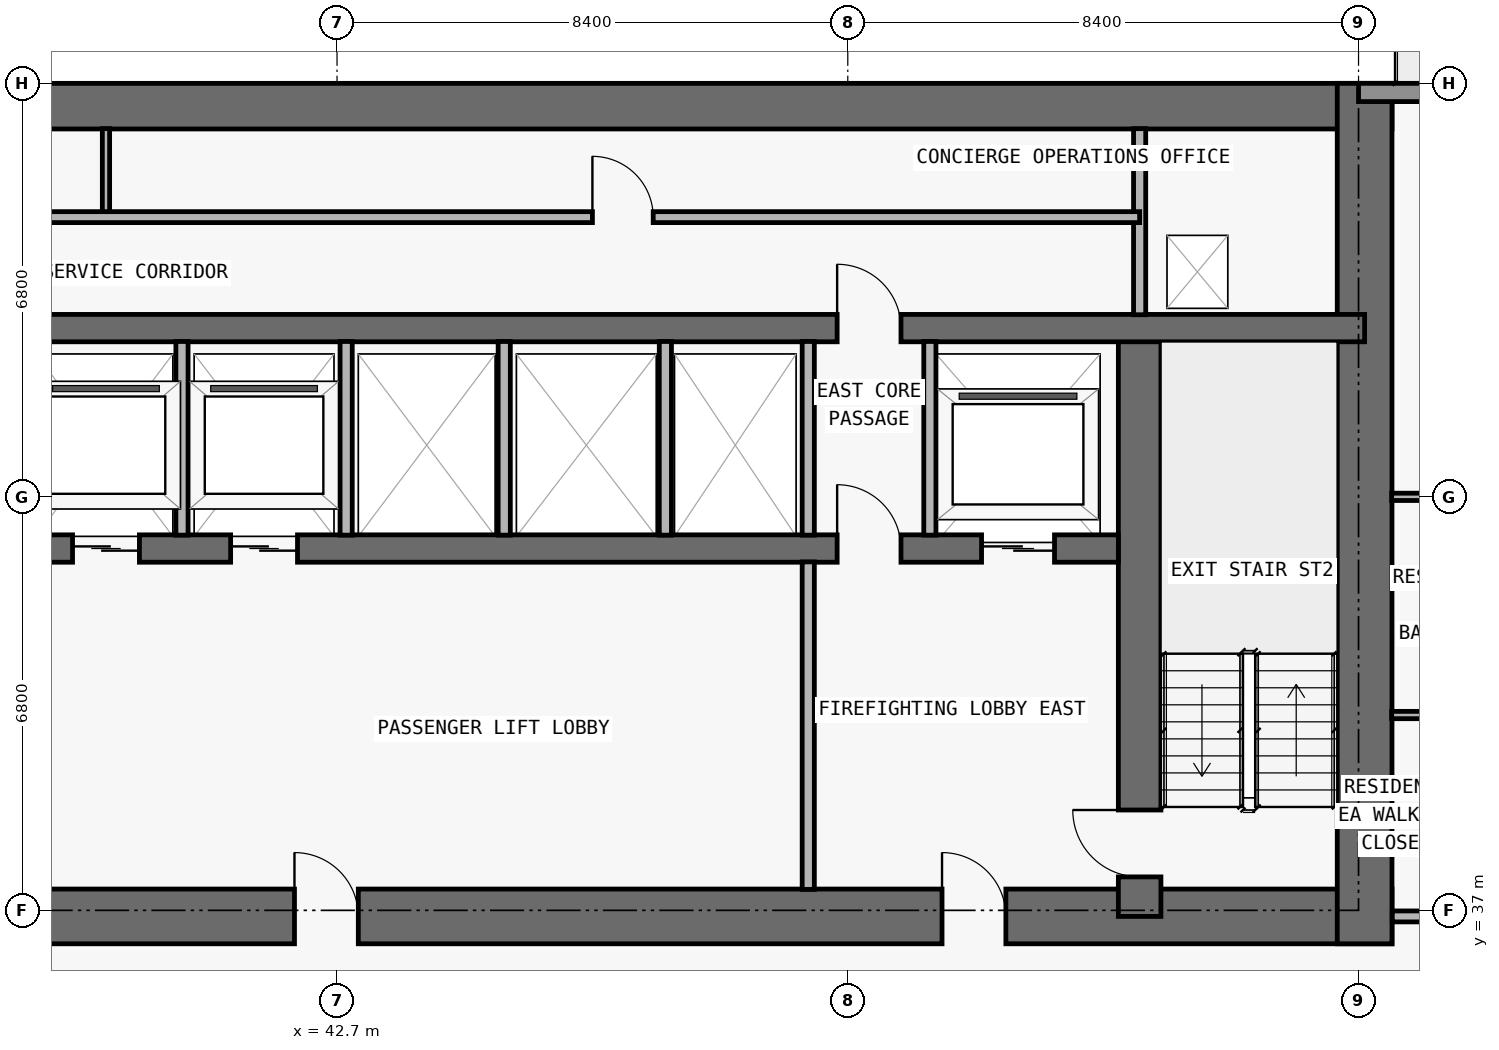
"""IFC4 building model, lengths in metres.
Left out: names, types, materials, properties, quantities, classifications, styles, units other than length and angle.
Written with IfcOpenShell. Run it as: python <this file> out.ifc"""

import sys

from ifc_helpers import new_model, si_unit, direction, frame, frame_2d, origin, place, context, subcontext, project, spatial, rectangle, extrude, element, fill, save


model = new_model("IFC4")
c1 = context("Model", 3, precision=1e-05, world=origin(), true_north=direction((0.0, 1.0)))
c2 = subcontext(c1, "Body", "Model", "MODEL_VIEW")
j1 = project(units=[si_unit("LENGTHUNIT", "METRE"), si_unit("PLANEANGLEUNIT", "RADIAN")], contexts=[c1])
p1 = place(None, origin())
s1 = spatial("IfcSite", under=j1, at=p1, CompositionType="ELEMENT")
p2 = place(p1, origin())
s2 = spatial("IfcBuilding", under=s1, at=p2, CompositionType="ELEMENT")
p3 = place(p2, frame((0.0, 0.0, 69.6)))
s3 = spatial("IfcBuildingStorey", under=s2, at=p3, CompositionType="ELEMENT", Elevation=69.6)
p4 = place(p3, frame((17.75, 36.9, 0.0), z_axis=(0.0, 0.0, 1.0), x_axis=(1.0, 0.0, 0.0)))
e1 = element("IfcWall", 1, at=p4, inside=s3, PredefinedType="SHEAR", context=c2, shape_type="SweptSolid", body=[
    extrude(rectangle(XDim=42.3, YDim=0.9, at=frame_2d((21.15, 0.0))), origin(), (0.0, 0.0, 1.0), 3.05),
])
p5 = place(p4, frame((14.55, 0.0, 0.0)))
e2 = element("IfcOpeningElement", 2, at=p5, cuts=e1, PredefinedType="OPENING", context=c2, shape_type="SweptSolid", body=[
    extrude(rectangle(XDim=1.1, YDim=2.15, at=frame_2d((0.55, 1.075))), frame((0.0, 0.46, 0.0), z_axis=(0.0, -1.0, 0.0), x_axis=(1.0, 0.0, 0.0)), (0.0, 0.0, 1.0), 0.92),
])
p6 = place(p4, frame((6.4, 0.0, 0.0)))
e3 = element("IfcOpeningElement", 3, at=p6, cuts=e1, PredefinedType="OPENING", context=c2, shape_type="SweptSolid", body=[
    extrude(rectangle(XDim=1.05, YDim=2.15, at=frame_2d((0.525, 1.075))), frame((0.0, 0.46, 0.0), z_axis=(0.0, -1.0, 0.0), x_axis=(1.0, 0.0, 0.0)), (0.0, 0.0, 1.0), 0.92),
])
p7 = place(p4, frame((34.9, 0.0, 0.0)))
e4 = element("IfcOpeningElement", 4, at=p7, cuts=e1, PredefinedType="OPENING", context=c2, shape_type="SweptSolid", body=[
    extrude(rectangle(XDim=1.05, YDim=2.15, at=frame_2d((0.525, 1.075))), frame((0.0, 0.46, 0.0), z_axis=(0.0, -1.0, 0.0), x_axis=(1.0, 0.0, 0.0)), (0.0, 0.0, 1.0), 0.92),
])
p8 = place(p4, frame((11.012, 0.0, 0.0)))
e5 = element("IfcOpeningElement", 5, at=p8, cuts=e1, PredefinedType="OPENING", context=c2, shape_type="SweptSolid", body=[
    extrude(rectangle(XDim=1.05, YDim=2.15, at=frame_2d((0.525, 1.075))), frame((0.0, 0.46, 0.0), z_axis=(0.0, -1.0, 0.0), x_axis=(1.0, 0.0, 0.0)), (0.0, 0.0, 1.0), 0.92),
])
p9 = place(p4, frame((24.25, 0.0, 0.0)))
e6 = element("IfcOpeningElement", 6, at=p9, cuts=e1, PredefinedType="OPENING", context=c2, shape_type="SweptSolid", body=[
    extrude(rectangle(XDim=1.05, YDim=2.15, at=frame_2d((0.525, 1.075))), frame((0.0, 0.46, 0.0), z_axis=(0.0, -1.0, 0.0), x_axis=(1.0, 0.0, 0.0)), (0.0, 0.0, 1.0), 0.92),
])
p10 = place(p3, frame((17.75, 50.225, 0.0), z_axis=(0.0, 0.0, 1.0), x_axis=(1.0, 0.0, 0.0)))
e7 = element("IfcWall", 7, at=p10, inside=s3, PredefinedType="SHEAR", context=c2, shape_type="SweptSolid", body=[
    extrude(rectangle(XDim=42.3, YDim=0.75, at=frame_2d((21.15, 0.0))), origin(), (0.0, 0.0, 1.0), 3.05),
])
p11 = place(p3, frame((59.6, 36.45, 0.0), z_axis=(0.0, 0.0, 1.0), x_axis=(0.0, 1.0, 0.0)))
e8 = element("IfcWall", 8, at=p11, inside=s3, PredefinedType="SHEAR", context=c2, shape_type="SweptSolid", body=[
    extrude(rectangle(XDim=14.15, YDim=0.9, at=frame_2d((7.075, 0.0))), origin(), (0.0, 0.0, 1.0), 3.05),
])
p12 = place(p3, frame((55.9, 36.9, 0.0), z_axis=(0.0, 0.0, 1.0), x_axis=(0.0, 1.0, 0.0)))
e9 = element("IfcWall", 9, at=p12, inside=s3, PredefinedType="SHEAR", context=c2, shape_type="SweptSolid", body=[
    extrude(rectangle(XDim=9.675, YDim=0.7, at=frame_2d((4.837, 0.0))), origin(), (0.0, 0.0, 1.0), 3.05),
])
p13 = place(p12, frame((0.65, 0.0, 0.0)))
e10 = element("IfcOpeningElement", 10, at=p13, cuts=e9, PredefinedType="OPENING", context=c2, shape_type="SweptSolid", body=[
    extrude(rectangle(XDim=1.1, YDim=2.15, at=frame_2d((0.55, 1.075))), frame((0.0, 0.36, 0.0), z_axis=(0.0, -1.0, 0.0), x_axis=(1.0, 0.0, 0.0)), (0.0, 0.0, 1.0), 0.72),
])
p14 = place(p3, frame((22.25, 42.95, 0.0), z_axis=(0.0, 0.0, 1.0), x_axis=(1.0, 0.0, 0.0)))
e11 = element("IfcWall", 11, at=p14, inside=s3, PredefinedType="SHEAR", context=c2, shape_type="SweptSolid", body=[
    extrude(rectangle(XDim=33.3, YDim=0.45, at=frame_2d((16.65, 0.0))), origin(), (0.0, 0.0, 1.0), 3.05),
])
p15 = place(p14, frame((1.05, 0.0, 0.0)))
e12 = element("IfcOpeningElement", 12, at=p15, cuts=e11, PredefinedType="OPENING", context=c2, shape_type="SweptSolid", body=[
    extrude(rectangle(XDim=1.2, YDim=2.2, at=frame_2d((0.6, 1.1))), frame((0.0, 0.235, 0.0), z_axis=(0.0, -1.0, 0.0), x_axis=(1.0, 0.0, 0.0)), (0.0, 0.0, 1.0), 0.47),
])
p16 = place(p14, frame((31.05, 0.0, 0.0)))
e13 = element("IfcOpeningElement", 13, at=p16, cuts=e11, PredefinedType="OPENING", context=c2, shape_type="SweptSolid", body=[
    extrude(rectangle(XDim=1.2, YDim=2.2, at=frame_2d((0.6, 1.1))), frame((0.0, 0.235, 0.0), z_axis=(0.0, -1.0, 0.0), x_axis=(1.0, 0.0, 0.0)), (0.0, 0.0, 1.0), 0.47),
])
p17 = place(p14, frame((13.5, 0.0, 0.0)))
e14 = element("IfcOpeningElement", 14, at=p17, cuts=e11, PredefinedType="OPENING", context=c2, shape_type="SweptSolid", body=[
    extrude(rectangle(XDim=1.1, YDim=2.2, at=frame_2d((0.55, 1.1))), frame((0.0, 0.235, 0.0), z_axis=(0.0, -1.0, 0.0), x_axis=(1.0, 0.0, 0.0)), (0.0, 0.0, 1.0), 0.47),
])
p18 = place(p14, frame((16.1, 0.0, 0.0)))
e15 = element("IfcOpeningElement", 15, at=p18, cuts=e11, PredefinedType="OPENING", context=c2, shape_type="SweptSolid", body=[
    extrude(rectangle(XDim=1.1, YDim=2.2, at=frame_2d((0.55, 1.1))), frame((0.0, 0.235, 0.0), z_axis=(0.0, -1.0, 0.0), x_axis=(1.0, 0.0, 0.0)), (0.0, 0.0, 1.0), 0.47),
])
p19 = place(p14, frame((18.7, 0.0, 0.0)))
e16 = element("IfcOpeningElement", 16, at=p19, cuts=e11, PredefinedType="OPENING", context=c2, shape_type="SweptSolid", body=[
    extrude(rectangle(XDim=1.1, YDim=2.2, at=frame_2d((0.55, 1.1))), frame((0.0, 0.235, 0.0), z_axis=(0.0, -1.0, 0.0), x_axis=(1.0, 0.0, 0.0)), (0.0, 0.0, 1.0), 0.47),
])
p20 = place(p14, frame((3.625, 0.0, 0.0)))
e17 = element("IfcOpeningElement", 17, at=p20, cuts=e11, PredefinedType="OPENING", context=c2, shape_type="SweptSolid", body=[
    extrude(rectangle(XDim=1.05, YDim=2.15, at=frame_2d((0.525, 1.075))), frame((0.0, 0.235, 0.0), z_axis=(0.0, -1.0, 0.0), x_axis=(1.0, 0.0, 0.0)), (0.0, 0.0, 1.0), 0.47),
])
p21 = place(p14, frame((28.675, 0.0, 0.0)))
e18 = element("IfcOpeningElement", 18, at=p21, cuts=e11, PredefinedType="OPENING", context=c2, shape_type="SweptSolid", body=[
    extrude(rectangle(XDim=1.05, YDim=2.15, at=frame_2d((0.525, 1.075))), frame((0.0, 0.235, 0.0), z_axis=(0.0, -1.0, 0.0), x_axis=(1.0, 0.0, 0.0)), (0.0, 0.0, 1.0), 0.47),
])
p22 = place(p3, frame((18.2, 46.575, 0.0), z_axis=(0.0, 0.0, 1.0), x_axis=(1.0, 0.0, 0.0)))
e19 = element("IfcWall", 19, at=p22, inside=s3, PredefinedType="SHEAR", context=c2, shape_type="SweptSolid", body=[
    extrude(rectangle(XDim=41.4, YDim=0.45, at=frame_2d((20.7, 0.0))), origin(), (0.0, 0.0, 1.0), 3.05),
])
p23 = place(p22, frame((7.675, 0.0, 0.0)))
e20 = element("IfcOpeningElement", 20, at=p23, cuts=e19, PredefinedType="OPENING", context=c2, shape_type="SweptSolid", body=[
    extrude(rectangle(XDim=1.05, YDim=2.15, at=frame_2d((0.525, 1.075))), frame((0.0, 0.235, 0.0), z_axis=(0.0, -1.0, 0.0), x_axis=(1.0, 0.0, 0.0)), (0.0, 0.0, 1.0), 0.47),
])
p24 = place(p22, frame((32.725, 0.0, 0.0)))
e21 = element("IfcOpeningElement", 21, at=p24, cuts=e19, PredefinedType="OPENING", context=c2, shape_type="SweptSolid", body=[
    extrude(rectangle(XDim=1.05, YDim=2.15, at=frame_2d((0.525, 1.075))), frame((0.0, 0.235, 0.0), z_axis=(0.0, -1.0, 0.0), x_axis=(1.0, 0.0, 0.0)), (0.0, 0.0, 1.0), 0.47),
])
p25 = place(p3, frame((59.5, 50.45, 0.0), z_axis=(0.0, 0.0, 1.0), x_axis=(1.0, 0.0, 0.0)))
e22 = element("IfcWall", 22, at=p25, inside=s3, PredefinedType="STANDARD", context=c2, shape_type="SweptSolid", body=[
    extrude(rectangle(XDim=13.2, YDim=0.3, at=frame_2d((6.6, 0.0))), origin(), (0.0, 0.0, 1.0), 3.05),
])
p26 = place(p25, frame((5.6, 0.0, 0.0)))
e23 = element("IfcOpeningElement", 23, at=p26, cuts=e22, PredefinedType="OPENING", context=c2, shape_type="SweptSolid", body=[
    extrude(rectangle(XDim=2.0, YDim=2.3, at=frame_2d((1.0, 1.15))), frame((0.0, 0.16, 0.0), z_axis=(0.0, -1.0, 0.0), x_axis=(1.0, 0.0, 0.0)), (0.0, 0.0, 1.0), 0.32),
])
p27 = place(p3, frame((38.9, 48.4, 0.0), z_axis=(0.0, 0.0, 1.0), x_axis=(0.0, 1.0, 0.0)))
e24 = element("IfcWall", 24, at=p27, inside=s3, PredefinedType="PARTITIONING", context=c2, shape_type="SweptSolid", body=[
    extrude(rectangle(XDim=1.455, YDim=0.12, at=frame_2d((0.728, 0.0))), origin(), (0.0, 0.0, 1.0), 3.05),
])
for number, where, z_axis, x_axis in (
    (25, (40.15, 43.17, 0.0), (0.0, 0.0, 1.0), (0.0, 1.0, 0.0)),
    (26, (42.85, 43.17, 0.0), (0.0, 0.0, 1.0), (0.0, 1.0, 0.0)),
    (27, (45.45, 43.17, 0.0), (0.0, 0.0, 1.0), (0.0, 1.0, 0.0)),
    (28, (48.1, 43.17, 0.0), (0.0, 0.0, 1.0), (0.0, 1.0, 0.0)),
):
    element("IfcWall", number, at=place(p3, frame(where, z_axis=z_axis, x_axis=x_axis)), inside=s3, PredefinedType="PARTITIONING", context=c2, shape_type="SweptSolid", body=[
        extrude(rectangle(XDim=3.185, YDim=0.2, at=frame_2d((1.593, 0.0))), origin(), (0.0, 0.0, 1.0), 3.05),
    ])
p28 = place(p3, frame((50.45, 37.345, 0.0), z_axis=(0.0, 0.0, 1.0), x_axis=(0.0, 1.0, 0.0)))
e29 = element("IfcWall", 29, at=p28, inside=s3, PredefinedType="PARTITIONING", context=c2, shape_type="SweptSolid", body=[
    extrude(rectangle(XDim=5.385, YDim=0.2, at=frame_2d((2.692, 0.0))), origin(), (0.0, 0.0, 1.0), 3.05),
])
for number, where, z_axis, x_axis in (
    (30, (50.45, 43.17, 0.0), (0.0, 0.0, 1.0), (0.0, 1.0, 0.0)),
    (31, (52.45, 43.17, 0.0), (0.0, 0.0, 1.0), (0.0, 1.0, 0.0)),
):
    element("IfcWall", number, at=place(p3, frame(where, z_axis=z_axis, x_axis=x_axis)), inside=s3, PredefinedType="PARTITIONING", context=c2, shape_type="SweptSolid", body=[
        extrude(rectangle(XDim=3.185, YDim=0.2, at=frame_2d((1.593, 0.0))), origin(), (0.0, 0.0, 1.0), 3.05),
    ])
p29 = place(p3, frame((55.9, 46.795, 0.0), z_axis=(0.0, 0.0, 1.0), x_axis=(0.0, 1.0, 0.0)))
e32 = element("IfcWall", 32, at=p29, inside=s3, PredefinedType="PARTITIONING", context=c2, shape_type="SweptSolid", body=[
    extrude(rectangle(XDim=3.06, YDim=0.2, at=frame_2d((1.53, 0.0))), origin(), (0.0, 0.0, 1.0), 3.05),
])
p30 = place(p3, frame((60.055, 36.9, 0.0), z_axis=(0.0, 0.0, 1.0), x_axis=(1.0, 0.0, 0.0)))
e33 = element("IfcWall", 33, at=p30, inside=s3, PredefinedType="PARTITIONING", context=c2, shape_type="SweptSolid", body=[
    extrude(rectangle(XDim=12.645, YDim=0.18, at=frame_2d((6.323, 0.0))), origin(), (0.0, 0.0, 1.0), 3.05),
])
p31 = place(p30, frame((4.52, 0.0, 0.0)))
e34 = element("IfcOpeningElement", 34, at=p31, cuts=e33, PredefinedType="OPENING", context=c2, shape_type="SweptSolid", body=[
    extrude(rectangle(XDim=1.0, YDim=2.2, at=frame_2d((0.5, 1.1))), frame((0.0, 0.1, 0.0), z_axis=(0.0, -1.0, 0.0), x_axis=(1.0, 0.0, 0.0)), (0.0, 0.0, 1.0), 0.2),
])
p32 = place(p3, frame((60.045, 40.212, 0.0), z_axis=(0.0, 0.0, 1.0), x_axis=(1.0, 0.0, 0.0)))
e35 = element("IfcWall", 35, at=p32, inside=s3, PredefinedType="PARTITIONING", context=c2, shape_type="SweptSolid", body=[
    extrude(rectangle(XDim=2.205, YDim=0.12, at=frame_2d((1.103, 0.0))), origin(), (0.0, 0.0, 1.0), 3.05),
])
p33 = place(p3, frame((60.045, 43.8, 0.0), z_axis=(0.0, 0.0, 1.0), x_axis=(1.0, 0.0, 0.0)))
e36 = element("IfcWall", 36, at=p33, inside=s3, PredefinedType="PARTITIONING", context=c2, shape_type="SweptSolid", body=[
    extrude(rectangle(XDim=15.96, YDim=0.12, at=frame_2d((7.98, 0.0))), origin(), (0.0, 0.0, 1.0), 2.339),
])
p34 = place(p33, frame((9.805, 0.0, 0.0)))
e37 = element("IfcOpeningElement", 37, at=p34, cuts=e36, PredefinedType="OPENING", context=c2, shape_type="SweptSolid", body=[
    extrude(rectangle(XDim=0.9, YDim=2.15, at=frame_2d((0.45, 1.075))), frame((0.0, 0.07, 0.0), z_axis=(0.0, -1.0, 0.0), x_axis=(1.0, 0.0, 0.0)), (0.0, 0.0, 1.0), 0.14),
])
p35 = place(p33, frame((4.58, 0.0, 0.0)))
e38 = element("IfcOpeningElement", 38, at=p35, cuts=e36, PredefinedType="OPENING", context=c2, shape_type="SweptSolid", body=[
    extrude(rectangle(XDim=0.9, YDim=2.15, at=frame_2d((0.45, 1.075))), frame((0.0, 0.07, 0.0), z_axis=(0.0, -1.0, 0.0), x_axis=(1.0, 0.0, 0.0)), (0.0, 0.0, 1.0), 0.14),
])
p36 = place(p33, frame((0.677, 0.0, 0.0)))
e39 = element("IfcOpeningElement", 39, at=p36, cuts=e36, PredefinedType="OPENING", context=c2, shape_type="SweptSolid", body=[
    extrude(rectangle(XDim=0.85, YDim=2.1, at=frame_2d((0.425, 1.05))), frame((0.0, 0.07, 0.0), z_axis=(0.0, -1.0, 0.0), x_axis=(1.0, 0.0, 0.0)), (0.0, 0.0, 1.0), 0.14),
])
p37 = place(p3, frame((21.9, 48.4, 0.0), z_axis=(0.0, 0.0, 1.0), x_axis=(1.0, 0.0, 0.0)))
e40 = element("IfcWall", 40, at=p37, inside=s3, PredefinedType="PARTITIONING", context=c2, shape_type="SweptSolid", body=[
    extrude(rectangle(XDim=34.0, YDim=0.18, at=frame_2d((17.0, 0.0))), origin(), (0.0, 0.0, 1.0), 3.05),
])
p38 = place(p37, frame((8.0, 0.0, 0.0)))
e41 = element("IfcOpeningElement", 41, at=p38, cuts=e40, PredefinedType="OPENING", context=c2, shape_type="SweptSolid", body=[
    extrude(rectangle(XDim=1.0, YDim=2.2, at=frame_2d((0.5, 1.1))), frame((0.0, 0.1, 0.0), z_axis=(0.0, -1.0, 0.0), x_axis=(1.0, 0.0, 0.0)), (0.0, 0.0, 1.0), 0.2),
])
p39 = place(p37, frame((25.0, 0.0, 0.0)))
e42 = element("IfcOpeningElement", 42, at=p39, cuts=e40, PredefinedType="OPENING", context=c2, shape_type="SweptSolid", body=[
    extrude(rectangle(XDim=1.0, YDim=2.2, at=frame_2d((0.5, 1.1))), frame((0.0, 0.1, 0.0), z_axis=(0.0, -1.0, 0.0), x_axis=(1.0, 0.0, 0.0)), (0.0, 0.0, 1.0), 0.2),
])
p40 = place(p16, origin())
e43 = element("IfcDoor", 43, at=p40, inside=s3, OperationType="DOUBLE_DOOR_SLIDING", PredefinedType="DOOR", context=c2, shape_type="SweptSolid", body=[
    extrude(rectangle(XDim=1.2, YDim=2.2, at=frame_2d((0.6, 1.1))), frame((0.0, 0.025, 0.0), z_axis=(0.0, -1.0, 0.0), x_axis=(1.0, 0.0, 0.0)), (0.0, 0.0, 1.0), 0.05),
])
fill(e13, e43)
p41 = place(p18, origin())
e44 = element("IfcDoor", 44, at=p41, inside=s3, OperationType="DOUBLE_DOOR_SLIDING", PredefinedType="DOOR", context=c2, shape_type="SweptSolid", body=[
    extrude(rectangle(XDim=1.1, YDim=2.2, at=frame_2d((0.55, 1.1))), frame((0.0, 0.025, 0.0), z_axis=(0.0, -1.0, 0.0), x_axis=(1.0, 0.0, 0.0)), (0.0, 0.0, 1.0), 0.05),
])
fill(e15, e44)
p42 = place(p19, origin())
e45 = element("IfcDoor", 45, at=p42, inside=s3, OperationType="DOUBLE_DOOR_SLIDING", PredefinedType="DOOR", context=c2, shape_type="SweptSolid", body=[
    extrude(rectangle(XDim=1.1, YDim=2.2, at=frame_2d((0.55, 1.1))), frame((0.0, 0.025, 0.0), z_axis=(0.0, -1.0, 0.0), x_axis=(1.0, 0.0, 0.0)), (0.0, 0.0, 1.0), 0.05),
])
fill(e16, e45)
p43 = place(p7, origin())
e46 = element("IfcDoor", 46, at=p43, inside=s3, OperationType="SINGLE_SWING_LEFT", PredefinedType="DOOR", context=c2, shape_type="SweptSolid", body=[
    extrude(rectangle(XDim=1.05, YDim=2.15, at=frame_2d((0.525, 1.075))), frame((0.0, 0.025, 0.0), z_axis=(0.0, -1.0, 0.0), x_axis=(1.0, 0.0, 0.0)), (0.0, 0.0, 1.0), 0.05),
])
fill(e4, e46)
p44 = place(p13, origin())
e47 = element("IfcDoor", 47, at=p44, inside=s3, OperationType="SINGLE_SWING_RIGHT", PredefinedType="DOOR", context=c2, shape_type="SweptSolid", body=[
    extrude(rectangle(XDim=1.1, YDim=2.15, at=frame_2d((0.55, 1.075))), frame((0.0, 0.025, 0.0), z_axis=(0.0, -1.0, 0.0), x_axis=(1.0, 0.0, 0.0)), (0.0, 0.0, 1.0), 0.05),
])
fill(e10, e47)
p45 = place(p21, origin())
e48 = element("IfcDoor", 48, at=p45, inside=s3, OperationType="SINGLE_SWING_LEFT", PredefinedType="DOOR", context=c2, shape_type="SweptSolid", body=[
    extrude(rectangle(XDim=1.05, YDim=2.15, at=frame_2d((0.525, 1.075))), frame((0.0, 0.025, 0.0), z_axis=(0.0, -1.0, 0.0), x_axis=(1.0, 0.0, 0.0)), (0.0, 0.0, 1.0), 0.05),
])
fill(e18, e48)
p46 = place(p9, origin())
e49 = element("IfcDoor", 49, at=p46, inside=s3, OperationType="SINGLE_SWING_LEFT", PredefinedType="DOOR", context=c2, shape_type="SweptSolid", body=[
    extrude(rectangle(XDim=1.05, YDim=2.15, at=frame_2d((0.525, 1.075))), frame((0.0, 0.025, 0.0), z_axis=(0.0, -1.0, 0.0), x_axis=(1.0, 0.0, 0.0)), (0.0, 0.0, 1.0), 0.05),
])
fill(e6, e49)
p47 = place(p24, origin())
e50 = element("IfcDoor", 50, at=p47, inside=s3, OperationType="SINGLE_SWING_LEFT", PredefinedType="DOOR", context=c2, shape_type="SweptSolid", body=[
    extrude(rectangle(XDim=1.05, YDim=2.15, at=frame_2d((0.525, 1.075))), frame((0.0, 0.025, 0.0), z_axis=(0.0, -1.0, 0.0), x_axis=(1.0, 0.0, 0.0)), (0.0, 0.0, 1.0), 0.05),
])
fill(e21, e50)
p48 = place(p39, origin())
e51 = element("IfcDoor", 51, at=p48, inside=s3, OperationType="SINGLE_SWING_LEFT", PredefinedType="DOOR", context=c2, shape_type="SweptSolid", body=[
    extrude(rectangle(XDim=1.0, YDim=2.2, at=frame_2d((0.5, 1.1))), frame((0.0, 0.025, 0.0), z_axis=(0.0, -1.0, 0.0), x_axis=(1.0, 0.0, 0.0)), (0.0, 0.0, 1.0), 0.05),
])
fill(e42, e51)
save(model, sys.argv[1])
